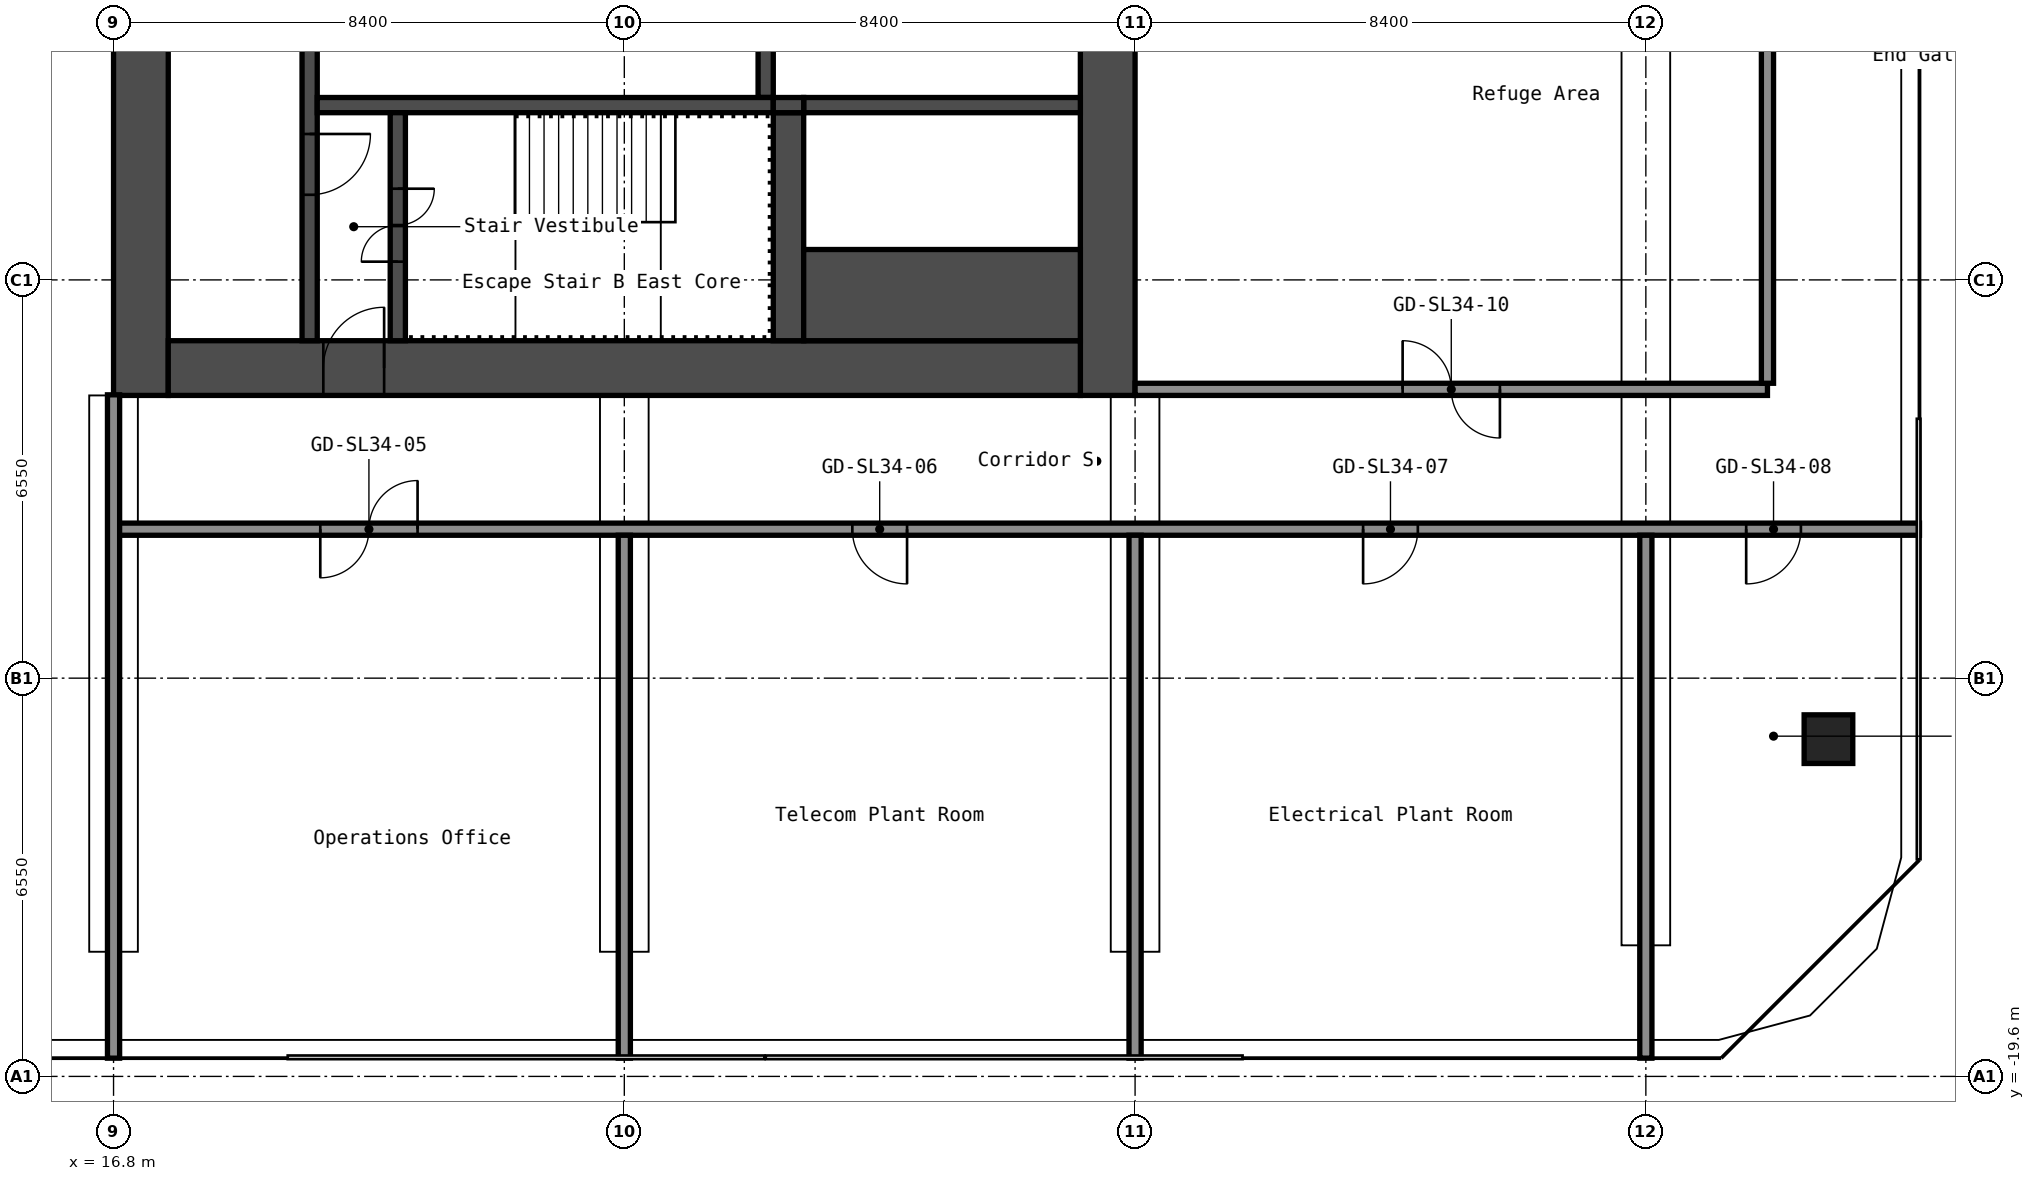
"""IFC4 building model, lengths in metres.
Left out: names, types, materials, properties, quantities, classifications, styles, units other than length and angle.
Written with IfcOpenShell. Run it as: python <this file> out.ifc"""

import sys

from ifc_helpers import new_model, si_unit, direction, frame, frame_2d, origin, origin_2d, place, context, subcontext, project, spatial, rectangle, hollow_rectangle, extrude, element, fill, save


model = new_model("IFC4")
c1 = context("Model", 3, precision=1e-05, world=origin(), true_north=direction((0.0, 1.0)))
c2 = subcontext(c1, "Body", "Model", "MODEL_VIEW")
j1 = project(units=[si_unit("LENGTHUNIT", "METRE"), si_unit("PLANEANGLEUNIT", "RADIAN")], contexts=[c1])
p1 = place(None, origin())
s1 = spatial("IfcSite", under=j1, at=p1, CompositionType="ELEMENT")
p2 = place(p1, origin())
s2 = spatial("IfcBuilding", under=s1, at=p2, CompositionType="ELEMENT")
p3 = place(p2, frame((0.0, 0.0, 120.2)))
s3 = spatial("IfcBuildingStorey", under=s2, at=p3, CompositionType="ELEMENT", Elevation=120.2)
p4 = place(p3, frame((45.003, -14.053, 0.0), z_axis=(0.0, 0.0, 1.0), x_axis=(1.0, 0.0, 0.0)))
e1 = element("IfcColumn", 1, at=p4, inside=s3, PredefinedType="COLUMN", context=c2, shape_type="SweptSolid", body=[
    extrude(hollow_rectangle(XDim=0.8, YDim=0.8, WallThickness=0.032, at=origin_2d()), origin(), (0.0, 0.0, 1.0), 4.1),
])
p5 = place(p3, frame((17.25, -8.4, 0.0), z_axis=(0.0, 0.0, 1.0), x_axis=(0.0, 1.0, 0.0)))
e2 = element("IfcWall", 2, at=p5, inside=s3, PredefinedType="SHEAR", context=c2, shape_type="SweptSolid", body=[
    extrude(rectangle(XDim=16.8, YDim=0.9, at=frame_2d((8.4, 0.0))), origin(), (0.0, 0.0, 1.0), 4.1),
])
p6 = place(p5, frame((7.1, 0.0, 0.0)))
e3 = element("IfcOpeningElement", 3, at=p6, cuts=e2, PredefinedType="OPENING", context=c2, shape_type="SweptSolid", body=[
    extrude(rectangle(XDim=1.6, YDim=2.1, at=frame_2d((0.8, 1.05))), frame((0.0, 0.46, 0.0), z_axis=(0.0, -1.0, 0.0), x_axis=(1.0, 0.0, 0.0)), (0.0, 0.0, 1.0), 0.92),
])
p7 = place(p3, frame((33.15, -8.4, 0.0), z_axis=(0.0, 0.0, 1.0), x_axis=(0.0, 1.0, 0.0)))
e4 = element("IfcWall", 4, at=p7, inside=s3, PredefinedType="SHEAR", context=c2, shape_type="SweptSolid", body=[
    extrude(rectangle(XDim=16.8, YDim=0.9, at=frame_2d((8.4, 0.0))), origin(), (0.0, 0.0, 1.0), 4.1),
])
p8 = place(p3, frame((17.7, -7.95, 0.0), z_axis=(0.0, 0.0, 1.0), x_axis=(1.0, 0.0, 0.0)))
e5 = element("IfcWall", 5, at=p8, inside=s3, PredefinedType="SHEAR", context=c2, shape_type="SweptSolid", body=[
    extrude(rectangle(XDim=15.0, YDim=0.9, at=frame_2d((7.5, 0.0))), origin(), (0.0, 0.0, 1.0), 4.1),
])
p9 = place(p8, frame((2.55, 0.0, 0.0)))
e6 = element("IfcOpeningElement", 6, at=p9, cuts=e5, PredefinedType="OPENING", context=c2, shape_type="SweptSolid", body=[
    extrude(rectangle(XDim=1.0, YDim=2.1, at=frame_2d((0.5, 1.05))), frame((0.0, 0.46, 0.0), z_axis=(0.0, -1.0, 0.0), x_axis=(1.0, 0.0, 0.0)), (0.0, 0.0, 1.0), 0.92),
])
p10 = place(p3, frame((20.025, -7.5, 0.0), z_axis=(0.0, 0.0, 1.0), x_axis=(0.0, 1.0, 0.0)))
e7 = element("IfcWall", 7, at=p10, inside=s3, PredefinedType="SHEAR", context=c2, shape_type="SweptSolid", body=[
    extrude(rectangle(XDim=6.3, YDim=0.25, at=frame_2d((3.15, 0.0))), origin(), (0.0, 0.0, 1.0), 4.1),
])
p11 = place(p10, frame((2.4, 0.0, 0.0)))
e8 = element("IfcOpeningElement", 8, at=p11, cuts=e7, PredefinedType="OPENING", context=c2, shape_type="SweptSolid", body=[
    extrude(rectangle(XDim=1.0, YDim=2.1, at=frame_2d((0.5, 1.05))), frame((0.0, 0.135, 0.0), z_axis=(0.0, -1.0, 0.0), x_axis=(1.0, 0.0, 0.0)), (0.0, 0.0, 1.0), 0.27),
])
p12 = place(p3, frame((27.525, -3.5, 0.0), z_axis=(0.0, 0.0, 1.0), x_axis=(0.0, 1.0, 0.0)))
e9 = element("IfcWall", 9, at=p12, inside=s3, PredefinedType="SHEAR", context=c2, shape_type="SweptSolid", body=[
    extrude(rectangle(XDim=2.05, YDim=0.25, at=frame_2d((1.025, 0.0))), origin(), (0.0, 0.0, 1.0), 4.1),
])
p13 = place(p3, frame((20.15, -3.625, 0.0), z_axis=(0.0, 0.0, 1.0), x_axis=(1.0, 0.0, 0.0)))
e10 = element("IfcWall", 10, at=p13, inside=s3, PredefinedType="SHEAR", context=c2, shape_type="SweptSolid", body=[
    extrude(rectangle(XDim=7.5, YDim=0.25, at=frame_2d((3.75, 0.0))), origin(), (0.0, 0.0, 1.0), 4.1),
])
p14 = place(p3, frame((21.475, -7.5, 0.0), z_axis=(0.0, 0.0, 1.0), x_axis=(0.0, 1.0, 0.0)))
e11 = element("IfcWall", 11, at=p14, inside=s3, PredefinedType="SHEAR", context=c2, shape_type="SweptSolid", body=[
    extrude(rectangle(XDim=3.75, YDim=0.25, at=frame_2d((1.875, 0.0))), origin(), (0.0, 0.0, 1.0), 4.1),
])
p15 = place(p14, frame((1.3, 0.0, 0.0)))
e12 = element("IfcOpeningElement", 12, at=p15, cuts=e11, PredefinedType="OPENING", context=c2, shape_type="SweptSolid", body=[
    extrude(rectangle(XDim=1.2, YDim=2.1, at=frame_2d((0.6, 1.05))), frame((0.0, 0.135, 0.0), z_axis=(0.0, -1.0, 0.0), x_axis=(1.0, 0.0, 0.0)), (0.0, 0.0, 1.0), 0.27),
])
p16 = place(p3, frame((27.9, -7.5, 0.0), z_axis=(0.0, 0.0, 1.0), x_axis=(0.0, 1.0, 0.0)))
e13 = element("IfcWall", 13, at=p16, inside=s3, PredefinedType="SHEAR", context=c2, shape_type="SweptSolid", body=[
    extrude(rectangle(XDim=3.75, YDim=0.5, at=frame_2d((1.875, 0.0))), origin(), (0.0, 0.0, 1.0), 4.1),
])
p17 = place(p3, frame((28.15, -3.625, 0.0), z_axis=(0.0, 0.0, 1.0), x_axis=(1.0, 0.0, 0.0)))
e14 = element("IfcWall", 14, at=p17, inside=s3, PredefinedType="SHEAR", context=c2, shape_type="SweptSolid", body=[
    extrude(rectangle(XDim=4.55, YDim=0.25, at=frame_2d((2.275, 0.0))), origin(), (0.0, 0.0, 1.0), 4.1),
])
p18 = place(p3, frame((28.15, -6.75, 0.0), z_axis=(0.0, 0.0, 1.0), x_axis=(1.0, 0.0, 0.0)))
e15 = element("IfcWall", 15, at=p18, inside=s3, PredefinedType="SHEAR", context=c2, shape_type="SweptSolid", body=[
    extrude(rectangle(XDim=4.55, YDim=1.5, at=frame_2d((2.275, 0.0))), origin(), (0.0, 0.0, 1.0), 4.1),
])
p19 = place(p3, frame((27.65, -3.625, 0.0), z_axis=(0.0, 0.0, 1.0), x_axis=(1.0, 0.0, 0.0)))
e16 = element("IfcWall", 16, at=p19, inside=s3, PredefinedType="SHEAR", context=c2, shape_type="SweptSolid", body=[
    extrude(rectangle(XDim=0.5, YDim=0.25, at=frame_2d((0.25, 0.0))), origin(), (0.0, 0.0, 1.0), 4.1),
])
p20 = place(p3, frame((16.8, -10.6, 0.0), z_axis=(0.0, 0.0, 1.0), x_axis=(1.0, 0.0, 0.0)))
e17 = element("IfcWall", 17, at=p20, inside=s3, PredefinedType="PARTITIONING", context=c2, shape_type="SweptSolid", body=[
    extrude(rectangle(XDim=29.7, YDim=0.2, at=frame_2d((14.85, 0.0))), origin(), (0.0, 0.0, 1.0), 4.1),
])
p21 = place(p20, frame((3.4, 0.0, 0.0)))
e18 = element("IfcOpeningElement", 18, at=p21, cuts=e17, PredefinedType="OPENING", context=c2, shape_type="SweptSolid", body=[
    extrude(rectangle(XDim=1.6, YDim=2.1, at=frame_2d((0.8, 1.05))), frame((0.0, 0.11, 0.0), z_axis=(0.0, -1.0, 0.0), x_axis=(1.0, 0.0, 0.0)), (0.0, 0.0, 1.0), 0.22),
])
p22 = place(p20, frame((12.15, 0.0, 0.0)))
e19 = element("IfcOpeningElement", 19, at=p22, cuts=e17, PredefinedType="OPENING", context=c2, shape_type="SweptSolid", body=[
    extrude(rectangle(XDim=0.9, YDim=2.1, at=frame_2d((0.45, 1.05))), frame((0.0, 0.11, 0.0), z_axis=(0.0, -1.0, 0.0), x_axis=(1.0, 0.0, 0.0)), (0.0, 0.0, 1.0), 0.22),
])
p23 = place(p20, frame((20.55, 0.0, 0.0)))
e20 = element("IfcOpeningElement", 20, at=p23, cuts=e17, PredefinedType="OPENING", context=c2, shape_type="SweptSolid", body=[
    extrude(rectangle(XDim=0.9, YDim=2.1, at=frame_2d((0.45, 1.05))), frame((0.0, 0.11, 0.0), z_axis=(0.0, -1.0, 0.0), x_axis=(1.0, 0.0, 0.0)), (0.0, 0.0, 1.0), 0.22),
])
p24 = place(p20, frame((26.85, 0.0, 0.0)))
e21 = element("IfcOpeningElement", 21, at=p24, cuts=e17, PredefinedType="OPENING", context=c2, shape_type="SweptSolid", body=[
    extrude(rectangle(XDim=0.9, YDim=2.1, at=frame_2d((0.45, 1.05))), frame((0.0, 0.11, 0.0), z_axis=(0.0, -1.0, 0.0), x_axis=(1.0, 0.0, 0.0)), (0.0, 0.0, 1.0), 0.22),
])
p25 = place(p3, frame((33.6, -8.3, 0.0), z_axis=(0.0, 0.0, 1.0), x_axis=(1.0, 0.0, 0.0)))
e22 = element("IfcWall", 22, at=p25, inside=s3, PredefinedType="PARTITIONING", context=c2, shape_type="SweptSolid", body=[
    extrude(rectangle(XDim=10.4, YDim=0.2, at=frame_2d((5.2, 0.0))), origin(), (0.0, 0.0, 1.0), 4.1),
])
p26 = place(p25, frame((4.4, 0.0, 0.0)))
e23 = element("IfcOpeningElement", 23, at=p26, cuts=e22, PredefinedType="OPENING", context=c2, shape_type="SweptSolid", body=[
    extrude(rectangle(XDim=1.6, YDim=2.1, at=frame_2d((0.8, 1.05))), frame((0.0, 0.11, 0.0), z_axis=(0.0, -1.0, 0.0), x_axis=(1.0, 0.0, 0.0)), (0.0, 0.0, 1.0), 0.22),
])
p27 = place(p3, frame((16.8, -19.3, 0.0), z_axis=(0.0, 0.0, 1.0), x_axis=(0.0, 1.0, 0.0)))
e24 = element("IfcWall", 24, at=p27, inside=s3, PredefinedType="PARTITIONING", context=c2, shape_type="SweptSolid", body=[
    extrude(rectangle(XDim=10.91, YDim=0.2, at=frame_2d((5.455, 0.0))), origin(), (0.0, 0.0, 1.0), 4.1),
])
for number, where, z_axis, x_axis in (
    (25, (25.2, -19.3, 0.0), (0.0, 0.0, 1.0), (0.0, 1.0, 0.0)),
    (26, (33.6, -19.3, 0.0), (0.0, 0.0, 1.0), (0.0, 1.0, 0.0)),
    (27, (42.0, -19.3, 0.0), (0.0, 0.0, 1.0), (0.0, 1.0, 0.0)),
):
    element("IfcWall", number, at=place(p3, frame(where, z_axis=z_axis, x_axis=x_axis)), inside=s3, PredefinedType="PARTITIONING", context=c2, shape_type="SweptSolid", body=[
        extrude(rectangle(XDim=8.6, YDim=0.2, at=frame_2d((4.3, 0.0))), origin(), (0.0, 0.0, 1.0), 4.1),
    ])
p28 = place(p3, frame((44.0, -8.2, 0.0), z_axis=(0.0, 0.0, 1.0), x_axis=(0.0, 1.0, 0.0)))
e28 = element("IfcWall", 28, at=p28, inside=s3, PredefinedType="PARTITIONING", context=c2, shape_type="SweptSolid", body=[
    extrude(rectangle(XDim=16.4, YDim=0.2, at=frame_2d((8.2, 0.0))), origin(), (0.0, 0.0, 1.0), 4.1),
])
p29 = place(p9, origin())
e29 = element("IfcDoor", 29, at=p29, inside=s3, OperationType="SINGLE_SWING_LEFT", PredefinedType="DOOR", context=c2, shape_type="SweptSolid", body=[
    extrude(rectangle(XDim=1.0, YDim=2.1, at=frame_2d((0.5, 1.05))), frame((0.0, 0.025, 0.0), z_axis=(0.0, -1.0, 0.0), x_axis=(1.0, 0.0, 0.0)), (0.0, 0.0, 1.0), 0.05),
])
fill(e6, e29)
p30 = place(p15, origin())
e30 = element("IfcDoor", 30, at=p30, inside=s3, OperationType="DOUBLE_DOOR_SINGLE_SWING", PredefinedType="DOOR", context=c2, shape_type="SweptSolid", body=[
    extrude(rectangle(XDim=1.2, YDim=2.1, at=frame_2d((0.6, 1.05))), frame((0.0, 0.025, 0.0), z_axis=(0.0, -1.0, 0.0), x_axis=(1.0, 0.0, 0.0)), (0.0, 0.0, 1.0), 0.05),
])
fill(e12, e30)
p31 = place(p11, origin())
e31 = element("IfcDoor", 31, at=p31, inside=s3, OperationType="SINGLE_SWING_RIGHT", PredefinedType="DOOR", context=c2, shape_type="SweptSolid", body=[
    extrude(rectangle(XDim=1.0, YDim=2.1, at=frame_2d((0.5, 1.05))), frame((0.0, 0.025, 0.0), z_axis=(0.0, -1.0, 0.0), x_axis=(1.0, 0.0, 0.0)), (0.0, 0.0, 1.0), 0.05),
])
fill(e8, e31)
p32 = place(p21, origin())
e32 = element("IfcDoor", 32, at=p32, inside=s3, OperationType="DOUBLE_DOOR_SINGLE_SWING", PredefinedType="DOOR", context=c2, shape_type="SweptSolid", body=[
    extrude(rectangle(XDim=1.6, YDim=2.1, at=frame_2d((0.8, 1.05))), frame((0.0, 0.025, 0.0), z_axis=(0.0, -1.0, 0.0), x_axis=(1.0, 0.0, 0.0)), (0.0, 0.0, 1.0), 0.05),
])
fill(e18, e32)
p33 = place(p22, origin())
e33 = element("IfcDoor", 33, at=p33, inside=s3, OperationType="SINGLE_SWING_RIGHT", PredefinedType="DOOR", context=c2, shape_type="SweptSolid", body=[
    extrude(rectangle(XDim=0.9, YDim=2.1, at=frame_2d((0.45, 1.05))), frame((0.0, 0.025, 0.0), z_axis=(0.0, -1.0, 0.0), x_axis=(1.0, 0.0, 0.0)), (0.0, 0.0, 1.0), 0.05),
])
fill(e19, e33)
p34 = place(p23, origin())
e34 = element("IfcDoor", 34, at=p34, inside=s3, OperationType="SINGLE_SWING_LEFT", PredefinedType="DOOR", context=c2, shape_type="SweptSolid", body=[
    extrude(rectangle(XDim=0.9, YDim=2.1, at=frame_2d((0.45, 1.05))), frame((0.0, 0.025, 0.0), z_axis=(0.0, -1.0, 0.0), x_axis=(1.0, 0.0, 0.0)), (0.0, 0.0, 1.0), 0.05),
])
fill(e20, e34)
p35 = place(p24, origin())
e35 = element("IfcDoor", 35, at=p35, inside=s3, OperationType="SINGLE_SWING_LEFT", PredefinedType="DOOR", context=c2, shape_type="SweptSolid", body=[
    extrude(rectangle(XDim=0.9, YDim=2.1, at=frame_2d((0.45, 1.05))), frame((0.0, 0.025, 0.0), z_axis=(0.0, -1.0, 0.0), x_axis=(1.0, 0.0, 0.0)), (0.0, 0.0, 1.0), 0.05),
])
fill(e21, e35)
p36 = place(p26, origin())
e36 = element("IfcDoor", 36, at=p36, inside=s3, OperationType="DOUBLE_DOOR_SINGLE_SWING", PredefinedType="DOOR", context=c2, shape_type="SweptSolid", body=[
    extrude(rectangle(XDim=1.6, YDim=2.1, at=frame_2d((0.8, 1.05))), frame((0.0, 0.025, 0.0), z_axis=(0.0, -1.0, 0.0), x_axis=(1.0, 0.0, 0.0)), (0.0, 0.0, 1.0), 0.05),
])
fill(e23, e36)
save(model, sys.argv[1])
